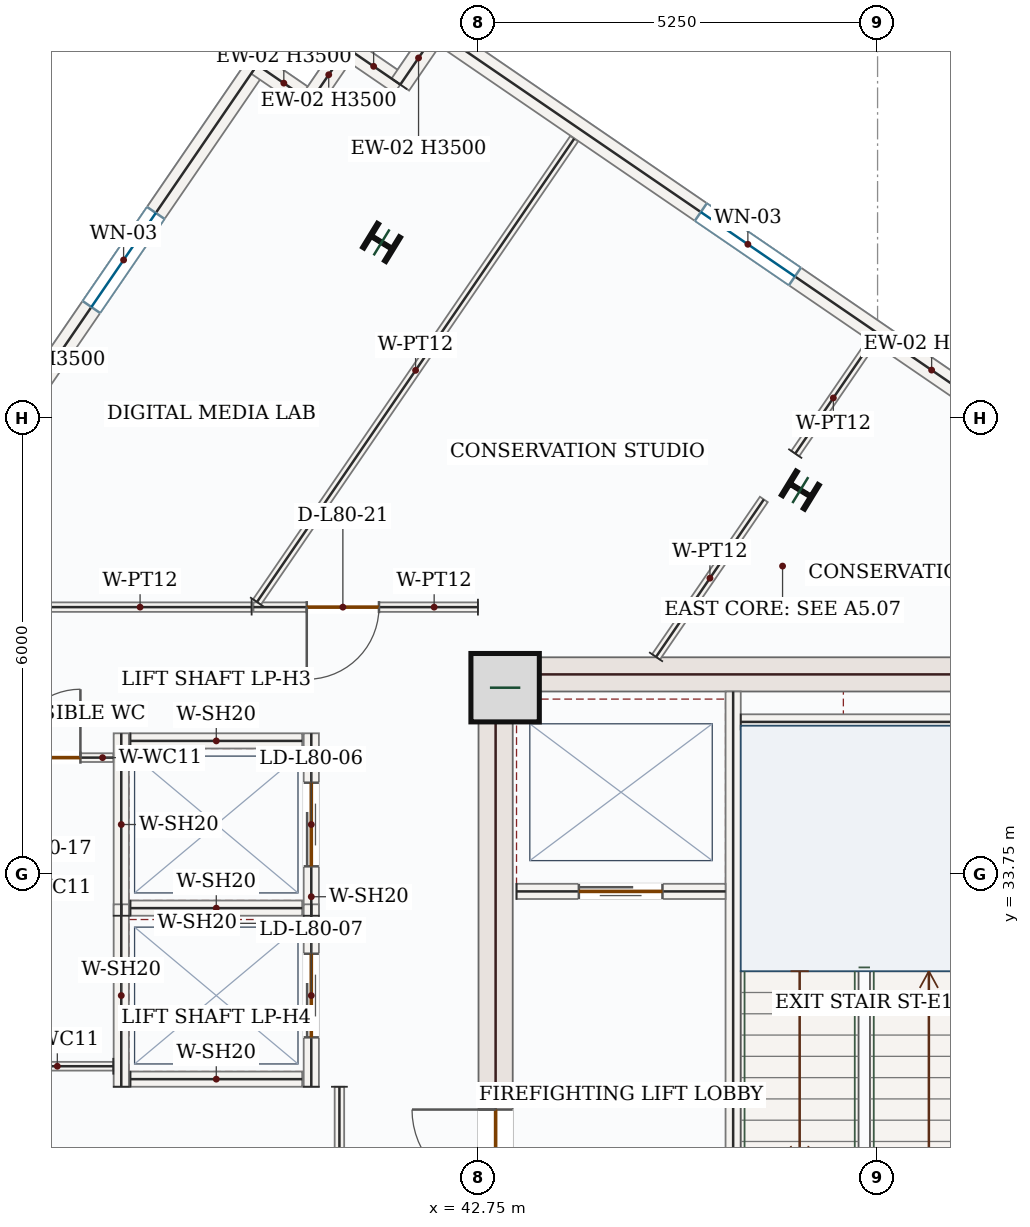
"""IFC4 building model, lengths in metres.
Left out: names, types, materials, properties, quantities, classifications, styles, units other than length and angle.
Written with IfcOpenShell. Run it as: python <this file> out.ifc"""

import sys

from ifc_helpers import new_model, si_unit, direction, frame, frame_2d, origin, origin_2d, place, context, subcontext, project, spatial, rectangle, i_section, extrude, source, transform, mapped, element, fill, save


model = new_model("IFC4")
c1 = context("Model", 3, precision=1e-05, world=origin(), true_north=direction((0.0, 1.0)))
c2 = subcontext(c1, "Body", "Model", "MODEL_VIEW")
j1 = project(units=[si_unit("LENGTHUNIT", "METRE"), si_unit("PLANEANGLEUNIT", "RADIAN")], contexts=[c1])
p1 = place(None, origin())
s1 = spatial("IfcSite", under=j1, at=p1, CompositionType="ELEMENT")
p2 = place(p1, origin())
s2 = spatial("IfcBuilding", under=s1, at=p2, CompositionType="ELEMENT")
p3 = place(p2, frame((0.0, 0.0, 331.05)))
s3 = spatial("IfcBuildingStorey", under=s2, at=p3, CompositionType="ELEMENT", Elevation=331.05)
p4 = place(p3, frame((42.975, 28.05, 0.0), z_axis=(0.0, 0.0, 1.0), x_axis=(0.0, 1.0, 0.0)))
e1 = element("IfcWall", 1, at=p4, inside=s3, PredefinedType="SHEAR", context=c2, shape_type="SweptSolid", body=[
    extrude(rectangle(XDim=8.55, YDim=0.45, at=frame_2d((4.275, 0.0))), origin(), (0.0, 0.0, 1.0), 3.5),
])
p5 = place(p4, frame((1.5, 0.0, 0.0)))
e2 = element("IfcOpeningElement", 2, at=p5, cuts=e1, PredefinedType="OPENING", context=c2, shape_type="SweptSolid", body=[
    extrude(rectangle(XDim=1.1, YDim=2.2, at=frame_2d((0.55, 1.1))), frame((0.0, 0.235, 0.0), z_axis=(0.0, -1.0, 0.0), x_axis=(1.0, 0.0, 0.0)), (0.0, 0.0, 1.0), 0.47),
])
m1 = source(origin(), c2, "Body", "SweptSolid", [
    extrude(rectangle(XDim=7.1, YDim=0.45, at=frame_2d((3.55, 0.0))), origin(), (0.0, 0.0, 1.0), 3.5),
])
p6 = place(p3, frame((43.2, 36.375, 0.0), z_axis=(0.0, 0.0, 1.0), x_axis=(1.0, 0.0, 0.0)))
e3 = element("IfcWall", 3, at=p6, inside=s3, PredefinedType="SHEAR", context=c2, shape_type="MappedRepresentation", body=[
    mapped(m1, transform((0.0, 0.0, 0.0), x_axis=(1.0, 0.0, 0.0), y_axis=(0.0, 1.0, 0.0), z_axis=(0.0, 0.0, 1.0), scale=1.0)),
])
m2 = source(origin(), c2, "Body", "SweptSolid", [
    extrude(rectangle(XDim=0.9, YDim=0.9, at=origin_2d()), origin(), (0.0, 0.0, 1.0), 3.75),
])
p7 = place(p3, frame((43.1, 36.2, 0.0), z_axis=(0.0, 0.0, 1.0), x_axis=(1.0, 0.0, 0.0)))
e4 = element("IfcColumn", 4, at=p7, inside=s3, PredefinedType="COLUMN", context=c2, shape_type="MappedRepresentation", body=[
    mapped(m2, transform((0.0, 0.0, 0.0), x_axis=(1.0, 0.0, 0.0), y_axis=(0.0, 1.0, 0.0), z_axis=(0.0, 0.0, 1.0), scale=1.0)),
])
m3 = source(origin(), c2, "Body", "SweptSolid", [
    extrude(i_section(OverallWidth=0.369, OverallDepth=0.356, WebThickness=0.011, FlangeThickness=0.018, FilletRadius=0.018, at=origin_2d()), origin(), (0.0, 0.0, 1.0), 3.75),
])
for number, where, z_axis, x_axis in (
    (5, (46.984, 38.8, 0.0), (0.0, 0.0, 1.0), (0.522, 0.853, 0.0)),
    (6, (41.475, 42.058, 0.0), (0.0, 0.0, 1.0), (0.522, 0.853, 0.0)),
):
    element("IfcColumn", number, at=place(p3, frame(where, z_axis=z_axis, x_axis=x_axis)), inside=s3, PredefinedType="COLUMN", context=c2, shape_type="MappedRepresentation", body=[
        mapped(m3, transform((0.0, 0.0, 0.0), x_axis=(1.0, 0.0, 0.0), y_axis=(0.0, 1.0, 0.0), z_axis=(0.0, 0.0, 1.0), scale=1.0)),
    ])
p8 = place(p3, frame((36.323, 39.26, 0.0), z_axis=(0.0, 0.0, 1.0), x_axis=(0.564953982519, 0.825122413728, 0.0)))
e7 = element("IfcWall", 7, at=p8, inside=s3, PredefinedType="SOLIDWALL", context=c2, shape_type="SweptSolid", body=[
    extrude(rectangle(XDim=6.221, YDim=0.28, at=frame_2d((3.111, 0.0))), origin(), (0.0, 0.0, 1.0), 3.5),
])
p9 = place(p8, frame((2.361, 0.0, 0.85)))
e8 = element("IfcOpeningElement", 8, at=p9, cuts=e7, PredefinedType="OPENING", context=c2, shape_type="SweptSolid", body=[
    extrude(rectangle(XDim=1.5, YDim=1.5, at=frame_2d((0.75, 0.75))), frame((0.0, 0.15, 0.0), z_axis=(0.0, -1.0, 0.0), x_axis=(1.0, 0.0, 0.0)), (0.0, 0.0, 1.0), 0.3),
])
m4 = source(origin(), c2, "Body", "SweptSolid", [
    extrude(rectangle(XDim=0.85, YDim=0.28, at=frame_2d((0.425, 0.0))), origin(), (0.0, 0.0, 1.0), 3.5),
])
for number, where, z_axis, x_axis in (
    (9, (39.838, 44.394, 0.0), (0.0, 0.0, 1.0), (0.825, -0.565, 0.0)),
    (10, (40.539, 43.913, 0.0), (0.0, 0.0, 1.0), (0.565, 0.825, 0.0)),
    (11, (41.02, 44.615, 0.0), (0.0, 0.0, 1.0), (0.825, -0.565, 0.0)),
):
    element("IfcWall", number, at=place(p3, frame(where, z_axis=z_axis, x_axis=x_axis)), inside=s3, PredefinedType="SOLIDWALL", context=c2, shape_type="MappedRepresentation", body=[
        mapped(m4, transform((0.0, 0.0, 0.0), x_axis=(1.0, 0.0, 0.0), y_axis=(0.0, 1.0, 0.0), z_axis=(0.0, 0.0, 1.0), scale=1.0)),
    ])
m5 = source(origin(), c2, "Body", "SweptSolid", [
    extrude(rectangle(XDim=0.85, YDim=0.28, at=frame_2d((0.425, 0.0))), origin(), (0.0, 0.0, 1.0), 3.5),
])
p10 = place(p3, frame((41.721, 44.135, 0.0), z_axis=(0.0, 0.0, 1.0), x_axis=(0.565064897913, 0.825046459993, 0.0)))
e12 = element("IfcWall", 12, at=p10, inside=s3, PredefinedType="SOLIDWALL", context=c2, shape_type="MappedRepresentation", body=[
    mapped(m5, transform((0.0, 0.0, 0.0), x_axis=(1.0, 0.0, 0.0), y_axis=(0.0, 1.0, 0.0), z_axis=(0.0, 0.0, 1.0), scale=1.0)),
])
p11 = place(p3, frame((42.201, 44.836, 0.0), z_axis=(0.0, 0.0, 1.0), x_axis=(0.825121888295, -0.56495474992, 0.0)))
e13 = element("IfcWall", 13, at=p11, inside=s3, PredefinedType="SOLIDWALL", context=c2, shape_type="SweptSolid", body=[
    extrude(rectangle(XDim=9.92, YDim=0.28, at=frame_2d((4.96, 0.0))), origin(), (0.0, 0.0, 1.0), 3.5),
])
p12 = place(p11, frame((4.21, 0.0, 0.85)))
e14 = element("IfcOpeningElement", 14, at=p12, cuts=e13, PredefinedType="OPENING", context=c2, shape_type="SweptSolid", body=[
    extrude(rectangle(XDim=1.5, YDim=1.5, at=frame_2d((0.75, 0.75))), frame((0.0, 0.15, 0.0), z_axis=(0.0, -1.0, 0.0), x_axis=(1.0, 0.0, 0.0)), (0.0, 0.0, 1.0), 0.3),
])
p13 = place(p3, frame((46.1, 28.15, 0.0), z_axis=(0.0, 0.0, 1.0), x_axis=(0.0, 1.0, 0.0)))
e15 = element("IfcWall", 15, at=p13, inside=s3, PredefinedType="SOLIDWALL", context=c2, shape_type="SweptSolid", body=[
    extrude(rectangle(XDim=8.0, YDim=0.2, at=frame_2d((4.0, 0.0))), origin(), (0.0, 0.0, 1.0), 3.5),
])
p14 = place(p13, frame((0.4, 0.0, 0.0)))
e16 = element("IfcOpeningElement", 16, at=p14, cuts=e15, PredefinedType="OPENING", context=c2, shape_type="SweptSolid", body=[
    extrude(rectangle(XDim=1.05, YDim=2.15, at=frame_2d((0.525, 1.075))), frame((0.0, 0.11, 0.0), z_axis=(0.0, -1.0, 0.0), x_axis=(1.0, 0.0, 0.0)), (0.0, 0.0, 1.0), 0.22),
])
m6 = source(origin(), c2, "Body", "SweptSolid", [
    extrude(rectangle(XDim=3.25, YDim=0.2, at=frame_2d((1.625, 0.0))), origin(), (0.0, 0.0, 1.0), 3.5),
])
p15 = place(p3, frame((46.2, 35.75, 0.0), z_axis=(0.0, 0.0, 1.0), x_axis=(1.0, 0.0, 0.0)))
e17 = element("IfcWall", 17, at=p15, inside=s3, PredefinedType="SOLIDWALL", context=c2, shape_type="MappedRepresentation", body=[
    mapped(m6, transform((0.0, 0.0, 0.0), x_axis=(1.0, 0.0, 0.0), y_axis=(0.0, 1.0, 0.0), z_axis=(0.0, 0.0, 1.0), scale=1.0)),
])
p16 = place(p3, frame((43.25, 33.52, 0.0), z_axis=(0.0, 0.0, 1.0), x_axis=(1.0, 0.0, 0.0)))
e18 = element("IfcWall", 18, at=p16, inside=s3, PredefinedType="SOLIDWALL", context=c2, shape_type="SweptSolid", body=[
    extrude(rectangle(XDim=2.75, YDim=0.2, at=frame_2d((1.375, 0.0))), origin(), (0.0, 0.0, 1.0), 3.5),
])
p17 = place(p16, frame((0.82, 0.0, 0.0)))
e19 = element("IfcOpeningElement", 19, at=p17, cuts=e18, PredefinedType="OPENING", context=c2, shape_type="SweptSolid", body=[
    extrude(rectangle(XDim=1.1, YDim=2.15, at=frame_2d((0.55, 1.075))), frame((0.0, 0.11, 0.0), z_axis=(0.0, -1.0, 0.0), x_axis=(1.0, 0.0, 0.0)), (0.0, 0.0, 1.0), 0.22),
])
m7 = source(origin(), c2, "Body", "SweptSolid", [
    extrude(rectangle(XDim=2.4, YDim=0.2, at=frame_2d((1.2, 0.0))), origin(), (0.0, 0.0, 1.0), 3.5),
])
p18 = place(p3, frame((38.05, 33.2, 0.0), z_axis=(0.0, 0.0, 1.0), x_axis=(0.0, 1.0, 0.0)))
e20 = element("IfcWall", 20, at=p18, inside=s3, PredefinedType="SOLIDWALL", context=c2, shape_type="MappedRepresentation", body=[
    mapped(m7, transform((0.0, 0.0, 0.0), x_axis=(1.0, 0.0, 0.0), y_axis=(0.0, 1.0, 0.0), z_axis=(0.0, 0.0, 1.0), scale=1.0)),
])
p19 = place(p3, frame((40.55, 33.2, 0.0), z_axis=(0.0, 0.0, 1.0), x_axis=(0.0, 1.0, 0.0)))
e21 = element("IfcWall", 21, at=p19, inside=s3, PredefinedType="SOLIDWALL", context=c2, shape_type="SweptSolid", body=[
    extrude(rectangle(XDim=2.4, YDim=0.2, at=frame_2d((1.2, 0.0))), origin(), (0.0, 0.0, 1.0), 3.5),
])
p20 = place(p19, frame((0.65, 0.0, 0.0)))
e22 = element("IfcOpeningElement", 22, at=p20, cuts=e21, PredefinedType="OPENING", context=c2, shape_type="SweptSolid", body=[
    extrude(rectangle(XDim=1.1, YDim=2.15, at=frame_2d((0.55, 1.075))), frame((0.0, 0.11, 0.0), z_axis=(0.0, -1.0, 0.0), x_axis=(1.0, 0.0, 0.0)), (0.0, 0.0, 1.0), 0.22),
])
m8 = source(origin(), c2, "Body", "SweptSolid", [
    extrude(rectangle(XDim=2.26, YDim=0.2, at=frame_2d((1.13, 0.0))), origin(), (0.0, 0.0, 1.0), 3.5),
])
for number, where, z_axis, x_axis in (
    (23, (38.17, 33.3, 0.0), (0.0, 0.0, 1.0), (1.0, 0.0, 0.0)),
    (24, (38.17, 35.5, 0.0), (0.0, 0.0, 1.0), (1.0, 0.0, 0.0)),
):
    element("IfcWall", number, at=place(p3, frame(where, z_axis=z_axis, x_axis=x_axis)), inside=s3, PredefinedType="SOLIDWALL", context=c2, shape_type="MappedRepresentation", body=[
        mapped(m8, transform((0.0, 0.0, 0.0), x_axis=(1.0, 0.0, 0.0), y_axis=(0.0, 1.0, 0.0), z_axis=(0.0, 0.0, 1.0), scale=1.0)),
    ])
p21 = place(p3, frame((38.05, 30.95, 0.0), z_axis=(0.0, 0.0, 1.0), x_axis=(0.0, 1.0, 0.0)))
e25 = element("IfcWall", 25, at=p21, inside=s3, PredefinedType="SOLIDWALL", context=c2, shape_type="MappedRepresentation", body=[
    mapped(m7, transform((0.0, 0.0, 0.0), x_axis=(1.0, 0.0, 0.0), y_axis=(0.0, 1.0, 0.0), z_axis=(0.0, 0.0, 1.0), scale=1.0)),
])
p22 = place(p3, frame((40.55, 30.95, 0.0), z_axis=(0.0, 0.0, 1.0), x_axis=(0.0, 1.0, 0.0)))
e26 = element("IfcWall", 26, at=p22, inside=s3, PredefinedType="SOLIDWALL", context=c2, shape_type="SweptSolid", body=[
    extrude(rectangle(XDim=2.4, YDim=0.2, at=frame_2d((1.2, 0.0))), origin(), (0.0, 0.0, 1.0), 3.5),
])
p23 = place(p22, frame((0.65, 0.0, 0.0)))
e27 = element("IfcOpeningElement", 27, at=p23, cuts=e26, PredefinedType="OPENING", context=c2, shape_type="SweptSolid", body=[
    extrude(rectangle(XDim=1.1, YDim=2.15, at=frame_2d((0.55, 1.075))), frame((0.0, 0.11, 0.0), z_axis=(0.0, -1.0, 0.0), x_axis=(1.0, 0.0, 0.0)), (0.0, 0.0, 1.0), 0.22),
])
p24 = place(p3, frame((38.17, 31.05, 0.0), z_axis=(0.0, 0.0, 1.0), x_axis=(1.0, 0.0, 0.0)))
e28 = element("IfcWall", 28, at=p24, inside=s3, PredefinedType="SOLIDWALL", context=c2, shape_type="MappedRepresentation", body=[
    mapped(m8, transform((0.0, 0.0, 0.0), x_axis=(1.0, 0.0, 0.0), y_axis=(0.0, 1.0, 0.0), z_axis=(0.0, 0.0, 1.0), scale=1.0)),
])
m9 = source(origin(), c2, "Body", "SweptSolid", [
    extrude(rectangle(XDim=1.473, YDim=0.115, at=frame_2d((0.736, 0.0))), origin(), (0.0, 0.0, 1.0), 3.5),
])
p25 = place(p3, frame((37.945, 31.22, 0.0), z_axis=(0.0, 0.0, 1.0), x_axis=(-1.0, 0.0, 0.0)))
e29 = element("IfcWall", 29, at=p25, inside=s3, PredefinedType="PARTITIONING", context=c2, shape_type="MappedRepresentation", body=[
    mapped(m9, transform((0.0, 0.0, 0.0), x_axis=(1.0, 0.0, 0.0), y_axis=(0.0, 1.0, 0.0), z_axis=(0.0, 0.0, 1.0), scale=1.0)),
])
p26 = place(p3, frame((36.472, 35.28, 0.0), z_axis=(0.0, 0.0, 1.0), x_axis=(1.0, 0.0, 0.0)))
e30 = element("IfcWall", 30, at=p26, inside=s3, PredefinedType="PARTITIONING", context=c2, shape_type="SweptSolid", body=[
    extrude(rectangle(XDim=1.473, YDim=0.115, at=frame_2d((0.736, 0.0))), origin(), (0.0, 0.0, 1.0), 3.5),
])
p27 = place(p26, frame((0.14, 0.0, 0.0)))
e31 = element("IfcOpeningElement", 31, at=p27, cuts=e30, PredefinedType="OPENING", context=c2, shape_type="SweptSolid", body=[
    extrude(rectangle(XDim=0.9, YDim=2.1, at=frame_2d((0.45, 1.05))), frame((0.0, 0.067, 0.0), z_axis=(0.0, -1.0, 0.0), x_axis=(1.0, 0.0, 0.0)), (0.0, 0.0, 1.0), 0.135),
])
m10 = source(origin(), c2, "Body", "SweptSolid", [
    extrude(rectangle(XDim=3.01, YDim=0.125, at=frame_2d((1.505, 0.0))), origin(), (0.0, 0.0, 1.0), 3.5),
])
p28 = place(p3, frame((40.92, 30.95, 0.0), z_axis=(0.0, 0.0, 1.0), x_axis=(0.0, -1.0, 0.0)))
e32 = element("IfcWall", 32, at=p28, inside=s3, PredefinedType="PARTITIONING", context=c2, shape_type="MappedRepresentation", body=[
    mapped(m10, transform((0.0, 0.0, 0.0), x_axis=(1.0, 0.0, 0.0), y_axis=(0.0, 1.0, 0.0), z_axis=(0.0, 0.0, 1.0), scale=1.0)),
])
m11 = source(origin(), c2, "Body", "SweptSolid", [
    extrude(rectangle(XDim=2.511, YDim=0.125, at=frame_2d((1.255, 0.0))), origin(), (0.0, 0.0, 1.0), 3.5),
])
p29 = place(p3, frame((45.085, 36.605, 0.0), z_axis=(0.0, 0.0, 1.0), x_axis=(0.564980194272, 0.825104466162, 0.0)))
e33 = element("IfcWall", 33, at=p29, inside=s3, PredefinedType="PARTITIONING", context=c2, shape_type="MappedRepresentation", body=[
    mapped(m11, transform((0.0, 0.0, 0.0), x_axis=(1.0, 0.0, 0.0), y_axis=(0.0, 1.0, 0.0), z_axis=(0.0, 0.0, 1.0), scale=1.0)),
])
m12 = source(origin(), c2, "Body", "SweptSolid", [
    extrude(rectangle(XDim=1.775, YDim=0.125, at=frame_2d((0.888, 0.0))), origin(), (0.0, 0.0, 1.0), 3.5),
])
p30 = place(p3, frame((46.917, 39.28, 0.0), z_axis=(0.0, 0.0, 1.0), x_axis=(0.56509798207, 0.825023800057, 0.0)))
e34 = element("IfcWall", 34, at=p30, inside=s3, PredefinedType="PARTITIONING", context=c2, shape_type="MappedRepresentation", body=[
    mapped(m12, transform((0.0, 0.0, 0.0), x_axis=(1.0, 0.0, 0.0), y_axis=(0.0, 1.0, 0.0), z_axis=(0.0, 0.0, 1.0), scale=1.0)),
])
p31 = place(p3, frame((42.742, 37.26, 0.0), z_axis=(0.0, 0.0, 1.0), x_axis=(-0.999999996583, 8.2671957e-05, 0.0)))
e35 = element("IfcWall", 35, at=p31, inside=s3, PredefinedType="PARTITIONING", context=c2, shape_type="SweptSolid", body=[
    extrude(rectangle(XDim=2.953, YDim=0.125, at=frame_2d((1.477, 0.0))), origin(), (0.0, 0.0, 1.0), 3.5),
])
p32 = place(p31, frame((1.302, 0.0, 0.0)))
e36 = element("IfcOpeningElement", 36, at=p32, cuts=e35, PredefinedType="OPENING", context=c2, shape_type="SweptSolid", body=[
    extrude(rectangle(XDim=0.95, YDim=2.15, at=frame_2d((0.475, 1.075))), frame((0.0, 0.073, 0.0), z_axis=(0.0, -1.0, 0.0), x_axis=(1.0, 0.0, 0.0)), (0.0, 0.0, 1.0), 0.145),
])
m13 = source(origin(), c2, "Body", "SweptSolid", [
    extrude(rectangle(XDim=7.387, YDim=0.125, at=frame_2d((3.693, 0.0))), origin(), (0.0, 0.0, 1.0), 3.5),
])
p33 = place(p3, frame((39.835, 37.327, 0.0), z_axis=(0.0, 0.0, 1.0), x_axis=(0.564969427755, 0.8251118383, 0.0)))
e37 = element("IfcWall", 37, at=p33, inside=s3, PredefinedType="PARTITIONING", context=c2, shape_type="MappedRepresentation", body=[
    mapped(m13, transform((0.0, 0.0, 0.0), x_axis=(1.0, 0.0, 0.0), y_axis=(0.0, 1.0, 0.0), z_axis=(0.0, 0.0, 1.0), scale=1.0)),
])
p34 = place(p3, frame((39.765, 37.26, 0.0), z_axis=(0.0, 0.0, 1.0), x_axis=(-1.0, 0.0, 0.0)))
e38 = element("IfcWall", 38, at=p34, inside=s3, PredefinedType="PARTITIONING", context=c2, shape_type="SweptSolid", body=[
    extrude(rectangle(XDim=5.696, YDim=0.125, at=frame_2d((2.848, 0.0))), origin(), (0.0, 0.0, 1.0), 3.5),
])
p35 = place(p34, frame((3.085, 0.0, 0.0)))
e39 = element("IfcOpeningElement", 39, at=p35, cuts=e38, PredefinedType="OPENING", context=c2, shape_type="SweptSolid", body=[
    extrude(rectangle(XDim=0.95, YDim=2.15, at=frame_2d((0.475, 1.075))), frame((0.0, 0.073, 0.0), z_axis=(0.0, -1.0, 0.0), x_axis=(1.0, 0.0, 0.0)), (0.0, 0.0, 1.0), 0.145),
])
m14 = source(origin(), c2, "Body", "SweptSolid", [
    extrude(rectangle(XDim=1.5, YDim=1.5, at=frame_2d((0.75, 0.75))), frame((0.0, 0.03, 0.0), z_axis=(0.0, -1.0, 0.0), x_axis=(1.0, 0.0, 0.0)), (0.0, 0.0, 1.0), 0.06),
])
p36 = place(p9, origin())
e40 = element("IfcWindow", 40, at=p36, inside=s3, PartitioningType="SINGLE_PANEL", PredefinedType="WINDOW", context=c2, shape_type="MappedRepresentation", body=[
    mapped(m14, transform((0.0, 0.0, 0.0), x_axis=(1.0, 0.0, 0.0), y_axis=(0.0, 1.0, 0.0), z_axis=(0.0, 0.0, 1.0), scale=1.0)),
])
fill(e8, e40)
p37 = place(p12, origin())
e41 = element("IfcWindow", 41, at=p37, inside=s3, PartitioningType="SINGLE_PANEL", PredefinedType="WINDOW", context=c2, shape_type="MappedRepresentation", body=[
    mapped(m14, transform((0.0, 0.0, 0.0), x_axis=(1.0, 0.0, 0.0), y_axis=(0.0, 1.0, 0.0), z_axis=(0.0, 0.0, 1.0), scale=1.0)),
])
fill(e14, e41)
m15 = source(origin(), c2, "Body", "SweptSolid", [
    extrude(rectangle(XDim=1.1, YDim=2.15, at=frame_2d((0.55, 1.075))), frame((0.0, 0.025, 0.0), z_axis=(0.0, -1.0, 0.0), x_axis=(1.0, 0.0, 0.0)), (0.0, 0.0, 1.0), 0.05),
])
p38 = place(p17, origin())
e42 = element("IfcDoor", 42, at=p38, inside=s3, OperationType="DOUBLE_DOOR_SLIDING", PredefinedType="DOOR", context=c2, shape_type="MappedRepresentation", body=[
    mapped(m15, transform((0.0, 0.0, 0.0), x_axis=(1.0, 0.0, 0.0), y_axis=(0.0, 1.0, 0.0), z_axis=(0.0, 0.0, 1.0), scale=1.0)),
])
fill(e19, e42)
m16 = source(origin(), c2, "Body", "SweptSolid", [
    extrude(rectangle(XDim=1.1, YDim=2.2, at=frame_2d((0.55, 1.1))), frame((0.0, 0.025, 0.0), z_axis=(0.0, -1.0, 0.0), x_axis=(1.0, 0.0, 0.0)), (0.0, 0.0, 1.0), 0.05),
])
p39 = place(p5, origin())
e43 = element("IfcDoor", 43, at=p39, inside=s3, OperationType="SINGLE_SWING_RIGHT", PredefinedType="DOOR", context=c2, shape_type="MappedRepresentation", body=[
    mapped(m16, transform((0.0, 0.0, 0.0), x_axis=(1.0, 0.0, 0.0), y_axis=(0.0, 1.0, 0.0), z_axis=(0.0, 0.0, 1.0), scale=1.0)),
])
fill(e2, e43)
p40 = place(p20, origin())
e44 = element("IfcDoor", 44, at=p40, inside=s3, OperationType="DOUBLE_DOOR_SLIDING", PredefinedType="DOOR", context=c2, shape_type="MappedRepresentation", body=[
    mapped(m15, transform((0.0, 0.0, 0.0), x_axis=(1.0, 0.0, 0.0), y_axis=(0.0, 1.0, 0.0), z_axis=(0.0, 0.0, 1.0), scale=1.0)),
])
fill(e22, e44)
p41 = place(p23, origin())
e45 = element("IfcDoor", 45, at=p41, inside=s3, OperationType="DOUBLE_DOOR_SLIDING", PredefinedType="DOOR", context=c2, shape_type="MappedRepresentation", body=[
    mapped(m15, transform((0.0, 0.0, 0.0), x_axis=(1.0, 0.0, 0.0), y_axis=(0.0, 1.0, 0.0), z_axis=(0.0, 0.0, 1.0), scale=1.0)),
])
fill(e27, e45)
m17 = source(origin(), c2, "Body", "SweptSolid", [
    extrude(rectangle(XDim=0.9, YDim=2.1, at=frame_2d((0.45, 1.05))), frame((0.0, 0.025, 0.0), z_axis=(0.0, -1.0, 0.0), x_axis=(1.0, 0.0, 0.0)), (0.0, 0.0, 1.0), 0.05),
])
p42 = place(p27, origin())
e46 = element("IfcDoor", 46, at=p42, inside=s3, OperationType="SINGLE_SWING_RIGHT", PredefinedType="DOOR", context=c2, shape_type="MappedRepresentation", body=[
    mapped(m17, transform((0.0, 0.0, 0.0), x_axis=(1.0, 0.0, 0.0), y_axis=(0.0, 1.0, 0.0), z_axis=(0.0, 0.0, 1.0), scale=1.0)),
])
fill(e31, e46)
m18 = source(origin(), c2, "Body", "SweptSolid", [
    extrude(rectangle(XDim=0.95, YDim=2.15, at=frame_2d((0.475, 1.075))), frame((0.0, 0.025, 0.0), z_axis=(0.0, -1.0, 0.0), x_axis=(1.0, 0.0, 0.0)), (0.0, 0.0, 1.0), 0.05),
])
p43 = place(p32, origin())
e47 = element("IfcDoor", 47, at=p43, inside=s3, OperationType="SINGLE_SWING_RIGHT", PredefinedType="DOOR", context=c2, shape_type="MappedRepresentation", body=[
    mapped(m18, transform((0.0, 0.0, 0.0), x_axis=(1.0, 0.0, 0.0), y_axis=(0.0, 1.0, 0.0), z_axis=(0.0, 0.0, 1.0), scale=1.0)),
])
fill(e36, e47)
save(model, sys.argv[1])
